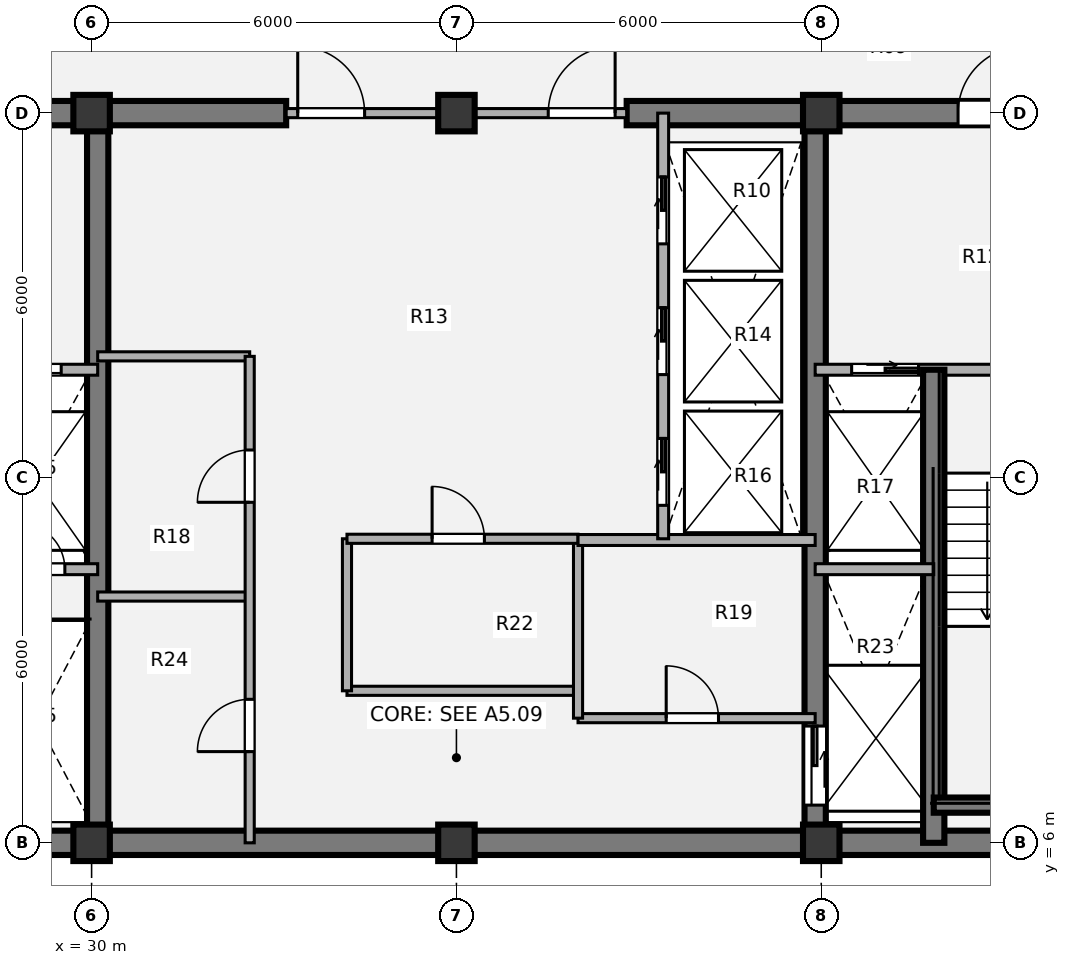
"""IFC4 building model, lengths in metres.
Left out: names, types, materials, properties, quantities, classifications, styles, units other than length and angle.
Written with IfcOpenShell. Run it as: python <this file> out.ifc"""

import sys

from ifc_helpers import new_model, si_unit, direction, frame, frame_2d, origin, origin_2d, place, context, subcontext, project, spatial, rectangle, extrude, source, transform, mapped, element, fill, save


model = new_model("IFC4")
c1 = context("Model", 3, precision=1e-05, world=origin(), true_north=direction((0.0, 1.0)))
c2 = subcontext(c1, "Body", "Model", "MODEL_VIEW")
j1 = project(units=[si_unit("LENGTHUNIT", "METRE"), si_unit("PLANEANGLEUNIT", "RADIAN")], contexts=[c1])
p1 = place(None, origin())
s1 = spatial("IfcSite", under=j1, at=p1, CompositionType="ELEMENT")
p2 = place(p1, origin())
s2 = spatial("IfcBuilding", under=s1, at=p2, CompositionType="ELEMENT")
p3 = place(p2, frame((0.0, 0.0, 257.04)))
s3 = spatial("IfcBuildingStorey", under=s2, at=p3, CompositionType="ELEMENT", Elevation=257.04)
m1 = source(origin(), c2, "Body", "SweptSolid", [
    extrude(rectangle(XDim=0.6, YDim=0.6, at=origin_2d()), origin(), (0.0, 0.0, 1.0), 3.78),
])
for number, where, z_axis, x_axis in (
    (1, (30.0, 6.0, 0.0), (0.0, 0.0, 1.0), (1.0, 0.0, 0.0)),
    (2, (36.0, 6.0, 0.0), (0.0, 0.0, 1.0), (1.0, 0.0, 0.0)),
    (3, (42.0, 6.0, 0.0), (0.0, 0.0, 1.0), (1.0, 0.0, 0.0)),
    (4, (30.0, 18.0, 0.0), (0.0, 0.0, 1.0), (1.0, 0.0, 0.0)),
    (5, (36.0, 18.0, 0.0), (0.0, 0.0, 1.0), (1.0, 0.0, 0.0)),
    (6, (42.0, 18.0, 0.0), (0.0, 0.0, 1.0), (1.0, 0.0, 0.0)),
):
    element("IfcColumn", number, at=place(p3, frame(where, z_axis=z_axis, x_axis=x_axis)), inside=s3, PredefinedType="COLUMN", context=c2, shape_type="MappedRepresentation", body=[
        mapped(m1, transform((0.0, 0.0, 0.0), x_axis=(1.0, 0.0, 0.0), y_axis=(0.0, 1.0, 0.0), z_axis=(0.0, 0.0, 1.0), scale=1.0)),
    ])
p4 = place(p3, frame((48.2, 6.0, 0.0), z_axis=(0.0, 0.0, 1.0), x_axis=(-1.0, 0.0, 0.0)))
e7 = element("IfcWall", 7, at=p4, inside=s3, PredefinedType="SHEAR", context=c2, shape_type="SweptSolid", body=[
    extrude(rectangle(XDim=24.4, YDim=0.4, at=frame_2d((12.2, 0.0))), origin(), (0.0, 0.0, 1.0), 3.78),
])
p5 = place(p3, frame((23.8, 18.0, 0.0), z_axis=(0.0, 0.0, 1.0), x_axis=(1.0, 0.0, 0.0)))
e8 = element("IfcWall", 8, at=p5, inside=s3, PredefinedType="SHEAR", context=c2, shape_type="SweptSolid", body=[
    extrude(rectangle(XDim=9.4, YDim=0.4, at=frame_2d((4.7, 0.0))), origin(), (0.0, 0.0, 1.0), 3.78),
])
p6 = place(p5, frame((2.95, 0.0, 0.0)))
e9 = element("IfcOpeningElement", 9, at=p6, cuts=e8, PredefinedType="OPENING", context=c2, shape_type="SweptSolid", body=[
    extrude(rectangle(XDim=1.1, YDim=2.1, at=origin_2d()), frame((0.55, 0.21, 1.05), z_axis=(0.0, -1.0, 0.0), x_axis=(1.0, 0.0, 0.0)), (0.0, 0.0, 1.0), 0.42),
])
p7 = place(p3, frame((38.8, 18.0, 0.0), z_axis=(0.0, 0.0, 1.0), x_axis=(1.0, 0.0, 0.0)))
e10 = element("IfcWall", 10, at=p7, inside=s3, PredefinedType="SHEAR", context=c2, shape_type="SweptSolid", body=[
    extrude(rectangle(XDim=9.4, YDim=0.4, at=frame_2d((4.7, 0.0))), origin(), (0.0, 0.0, 1.0), 3.78),
])
p8 = place(p7, frame((5.45, 0.0, 0.0)))
e11 = element("IfcOpeningElement", 11, at=p8, cuts=e10, PredefinedType="OPENING", context=c2, shape_type="SweptSolid", body=[
    extrude(rectangle(XDim=1.1, YDim=2.1, at=origin_2d()), frame((0.55, 0.21, 1.05), z_axis=(0.0, -1.0, 0.0), x_axis=(1.0, 0.0, 0.0)), (0.0, 0.0, 1.0), 0.42),
])
p9 = place(p3, frame((30.1, 6.0, 0.0), z_axis=(0.0, 0.0, 1.0), x_axis=(0.0, 1.0, 0.0)))
e12 = element("IfcWall", 12, at=p9, inside=s3, PredefinedType="SHEAR", context=c2, shape_type="SweptSolid", body=[
    extrude(rectangle(XDim=12.0, YDim=0.35, at=frame_2d((6.0, 0.0))), origin(), (0.0, 0.0, 1.0), 3.78),
])
p10 = place(p3, frame((41.9, 18.0, 0.0), z_axis=(0.0, 0.0, 1.0), x_axis=(0.0, -1.0, 0.0)))
e13 = element("IfcWall", 13, at=p10, inside=s3, PredefinedType="SHEAR", context=c2, shape_type="SweptSolid", body=[
    extrude(rectangle(XDim=12.0, YDim=0.35, at=frame_2d((6.0, 0.0))), origin(), (0.0, 0.0, 1.0), 3.78),
])
p11 = place(p10, frame((10.08, 0.0, 0.0)))
e14 = element("IfcOpeningElement", 14, at=p11, cuts=e13, PredefinedType="OPENING", context=c2, shape_type="SweptSolid", body=[
    extrude(rectangle(XDim=1.3, YDim=2.1, at=origin_2d()), frame((0.65, 0.185, 1.05), z_axis=(0.0, -1.0, 0.0), x_axis=(1.0, 0.0, 0.0)), (0.0, 0.0, 1.0), 0.37),
])
p12 = place(p3, frame((30.1, 14.0, 0.0), z_axis=(0.0, 0.0, 1.0), x_axis=(1.0, 0.0, 0.0)))
e15 = element("IfcWall", 15, at=p12, inside=s3, PredefinedType="PARTITIONING", context=c2, shape_type="SweptSolid", body=[
    extrude(rectangle(XDim=2.5, YDim=0.15, at=frame_2d((1.25, 0.0))), origin(), (0.0, 0.0, 1.0), 3.5),
])
p13 = place(p3, frame((34.2, 8.5, 0.0), z_axis=(0.0, 0.0, 1.0), x_axis=(1.0, 0.0, 0.0)))
e16 = element("IfcWall", 16, at=p13, inside=s3, PredefinedType="PARTITIONING", context=c2, shape_type="SweptSolid", body=[
    extrude(rectangle(XDim=3.8, YDim=0.15, at=frame_2d((1.9, 0.0))), origin(), (0.0, 0.0, 1.0), 3.5),
])
p14 = place(p3, frame((38.0, 8.05, 0.0), z_axis=(0.0, 0.0, 1.0), x_axis=(1.0, 0.0, 0.0)))
e17 = element("IfcWall", 17, at=p14, inside=s3, PredefinedType="PARTITIONING", context=c2, shape_type="SweptSolid", body=[
    extrude(rectangle(XDim=3.9, YDim=0.15, at=frame_2d((1.95, 0.0))), origin(), (0.0, 0.0, 1.0), 3.5),
])
p15 = place(p14, frame((1.45, 0.0, 0.0)))
e18 = element("IfcOpeningElement", 18, at=p15, cuts=e17, PredefinedType="OPENING", context=c2, shape_type="SweptSolid", body=[
    extrude(rectangle(XDim=0.86, YDim=2.1, at=origin_2d()), frame((0.43, 0.085, 1.05), z_axis=(0.0, -1.0, 0.0), x_axis=(1.0, 0.0, 0.0)), (0.0, 0.0, 1.0), 0.17),
])
p16 = place(p3, frame((34.2, 8.5, 0.0), z_axis=(0.0, 0.0, 1.0), x_axis=(0.0, 1.0, 0.0)))
e19 = element("IfcWall", 19, at=p16, inside=s3, PredefinedType="PARTITIONING", context=c2, shape_type="SweptSolid", body=[
    extrude(rectangle(XDim=2.5, YDim=0.15, at=frame_2d((1.25, 0.0))), origin(), (0.0, 0.0, 1.0), 3.5),
])
p17 = place(p3, frame((38.0, 8.05, 0.0), z_axis=(0.0, 0.0, 1.0), x_axis=(0.0, 1.0, 0.0)))
e20 = element("IfcWall", 20, at=p17, inside=s3, PredefinedType="PARTITIONING", context=c2, shape_type="SweptSolid", body=[
    extrude(rectangle(XDim=2.95, YDim=0.15, at=frame_2d((1.475, 0.0))), origin(), (0.0, 0.0, 1.0), 3.5),
])
p18 = place(p3, frame((34.2, 11.0, 0.0), z_axis=(0.0, 0.0, 1.0), x_axis=(1.0, 0.0, 0.0)))
e21 = element("IfcWall", 21, at=p18, inside=s3, PredefinedType="PARTITIONING", context=c2, shape_type="SweptSolid", body=[
    extrude(rectangle(XDim=3.8, YDim=0.15, at=frame_2d((1.9, 0.0))), origin(), (0.0, 0.0, 1.0), 3.5),
])
p19 = place(p18, frame((1.4, 0.0, 0.0)))
e22 = element("IfcOpeningElement", 22, at=p19, cuts=e21, PredefinedType="OPENING", context=c2, shape_type="SweptSolid", body=[
    extrude(rectangle(XDim=0.86, YDim=2.1, at=origin_2d()), frame((0.43, 0.085, 1.05), z_axis=(0.0, -1.0, 0.0), x_axis=(1.0, 0.0, 0.0)), (0.0, 0.0, 1.0), 0.17),
])
p20 = place(p3, frame((38.0, 10.98, 0.0), z_axis=(0.0, 0.0, 1.0), x_axis=(1.0, 0.0, 0.0)))
e23 = element("IfcWall", 23, at=p20, inside=s3, PredefinedType="PARTITIONING", context=c2, shape_type="SweptSolid", body=[
    extrude(rectangle(XDim=3.9, YDim=0.18, at=frame_2d((1.95, 0.0))), origin(), (0.0, 0.0, 1.0), 3.5),
])
p21 = place(p3, frame((30.1, 10.05, 0.0), z_axis=(0.0, 0.0, 1.0), x_axis=(1.0, 0.0, 0.0)))
e24 = element("IfcWall", 24, at=p21, inside=s3, PredefinedType="PARTITIONING", context=c2, shape_type="SweptSolid", body=[
    extrude(rectangle(XDim=2.5, YDim=0.15, at=frame_2d((1.25, 0.0))), origin(), (0.0, 0.0, 1.0), 3.5),
])
p22 = place(p3, frame((32.6, 6.0, 0.0), z_axis=(0.0, 0.0, 1.0), x_axis=(0.0, 1.0, 0.0)))
e25 = element("IfcWall", 25, at=p22, inside=s3, PredefinedType="PARTITIONING", context=c2, shape_type="SweptSolid", body=[
    extrude(rectangle(XDim=8.0, YDim=0.15, at=frame_2d((4.0, 0.0))), origin(), (0.0, 0.0, 1.0), 3.5),
])
p23 = place(p22, frame((1.5, 0.0, 0.0)))
e26 = element("IfcOpeningElement", 26, at=p23, cuts=e25, PredefinedType="OPENING", context=c2, shape_type="SweptSolid", body=[
    extrude(rectangle(XDim=0.86, YDim=2.1, at=origin_2d()), frame((0.43, 0.085, 1.05), z_axis=(0.0, -1.0, 0.0), x_axis=(1.0, 0.0, 0.0)), (0.0, 0.0, 1.0), 0.17),
])
p24 = place(p22, frame((5.6, 0.0, 0.0)))
e27 = element("IfcOpeningElement", 27, at=p24, cuts=e25, PredefinedType="OPENING", context=c2, shape_type="SweptSolid", body=[
    extrude(rectangle(XDim=0.86, YDim=2.1, at=origin_2d()), frame((0.43, 0.085, 1.05), z_axis=(0.0, -1.0, 0.0), x_axis=(1.0, 0.0, 0.0)), (0.0, 0.0, 1.0), 0.17),
])
p25 = place(p3, frame((33.2, 18.0, 0.0), z_axis=(0.0, 0.0, 1.0), x_axis=(1.0, 0.0, 0.0)))
e28 = element("IfcWall", 28, at=p25, inside=s3, PredefinedType="PARTITIONING", context=c2, shape_type="SweptSolid", body=[
    extrude(rectangle(XDim=5.6, YDim=0.15, at=frame_2d((2.8, 0.0))), origin(), (0.0, 0.0, 1.0), 2.515),
])
p26 = place(p25, frame((0.19, 0.0, 0.0)))
e29 = element("IfcOpeningElement", 29, at=p26, cuts=e28, PredefinedType="OPENING", context=c2, shape_type="SweptSolid", body=[
    extrude(rectangle(XDim=1.1, YDim=2.1, at=origin_2d()), frame((0.55, 0.085, 1.05), z_axis=(0.0, -1.0, 0.0), x_axis=(1.0, 0.0, 0.0)), (0.0, 0.0, 1.0), 0.17),
])
p27 = place(p25, frame((4.31, 0.0, 0.0)))
e30 = element("IfcOpeningElement", 30, at=p27, cuts=e28, PredefinedType="OPENING", context=c2, shape_type="SweptSolid", body=[
    extrude(rectangle(XDim=1.1, YDim=2.1, at=origin_2d()), frame((0.55, 0.085, 1.05), z_axis=(0.0, -1.0, 0.0), x_axis=(1.0, 0.0, 0.0)), (0.0, 0.0, 1.0), 0.17),
])
p28 = place(p3, frame((24.0, 13.78, 0.0), z_axis=(0.0, 0.0, 1.0), x_axis=(1.0, 0.0, 0.0)))
e31 = element("IfcWall", 31, at=p28, inside=s3, PredefinedType="PARTITIONING", context=c2, shape_type="SweptSolid", body=[
    extrude(rectangle(XDim=6.1, YDim=0.18, at=frame_2d((3.05, 0.0))), origin(), (0.0, 0.0, 1.0), 3.5),
])
p29 = place(p28, frame((1.15, 0.0, 0.0)))
e32 = element("IfcOpeningElement", 32, at=p29, cuts=e31, PredefinedType="OPENING", context=c2, shape_type="SweptSolid", body=[
    extrude(rectangle(XDim=1.1, YDim=2.1, at=origin_2d()), frame((0.55, 0.1, 1.05), z_axis=(0.0, -1.0, 0.0), x_axis=(1.0, 0.0, 0.0)), (0.0, 0.0, 1.0), 0.2),
])
p30 = place(p28, frame((4.4, 0.0, 0.0)))
e33 = element("IfcOpeningElement", 33, at=p30, cuts=e31, PredefinedType="OPENING", context=c2, shape_type="SweptSolid", body=[
    extrude(rectangle(XDim=1.1, YDim=2.1, at=origin_2d()), frame((0.55, 0.1, 1.05), z_axis=(0.0, -1.0, 0.0), x_axis=(1.0, 0.0, 0.0)), (0.0, 0.0, 1.0), 0.2),
])
p31 = place(p3, frame((28.15, 10.5, 0.0), z_axis=(0.0, 0.0, 1.0), x_axis=(1.0, 0.0, 0.0)))
e34 = element("IfcWall", 34, at=p31, inside=s3, PredefinedType="PARTITIONING", context=c2, shape_type="SweptSolid", body=[
    extrude(rectangle(XDim=1.95, YDim=0.18, at=frame_2d((0.975, 0.0))), origin(), (0.0, 0.0, 1.0), 3.5),
])
p32 = place(p31, frame((0.65, 0.0, 0.0)))
e35 = element("IfcOpeningElement", 35, at=p32, cuts=e34, PredefinedType="OPENING", context=c2, shape_type="SweptSolid", body=[
    extrude(rectangle(XDim=0.76, YDim=2.05, at=origin_2d()), frame((0.38, 0.1, 1.025), z_axis=(0.0, -1.0, 0.0), x_axis=(1.0, 0.0, 0.0)), (0.0, 0.0, 1.0), 0.2),
])
p33 = place(p3, frame((41.9, 13.78, 0.0), z_axis=(0.0, 0.0, 1.0), x_axis=(1.0, 0.0, 0.0)))
e36 = element("IfcWall", 36, at=p33, inside=s3, PredefinedType="PARTITIONING", context=c2, shape_type="SweptSolid", body=[
    extrude(rectangle(XDim=6.1, YDim=0.18, at=frame_2d((3.05, 0.0))), origin(), (0.0, 0.0, 1.0), 3.5),
])
p34 = place(p33, frame((0.6, 0.0, 0.0)))
e37 = element("IfcOpeningElement", 37, at=p34, cuts=e36, PredefinedType="OPENING", context=c2, shape_type="SweptSolid", body=[
    extrude(rectangle(XDim=1.1, YDim=2.1, at=origin_2d()), frame((0.55, 0.1, 1.05), z_axis=(0.0, -1.0, 0.0), x_axis=(1.0, 0.0, 0.0)), (0.0, 0.0, 1.0), 0.2),
])
p35 = place(p33, frame((3.8, 0.0, 0.0)))
e38 = element("IfcOpeningElement", 38, at=p35, cuts=e36, PredefinedType="OPENING", context=c2, shape_type="SweptSolid", body=[
    extrude(rectangle(XDim=1.1, YDim=2.1, at=origin_2d()), frame((0.55, 0.1, 1.05), z_axis=(0.0, -1.0, 0.0), x_axis=(1.0, 0.0, 0.0)), (0.0, 0.0, 1.0), 0.2),
])
p36 = place(p3, frame((43.85, 6.0, 0.0), z_axis=(0.0, 0.0, 1.0), x_axis=(0.0, 1.0, 0.0)))
e39 = element("IfcWall", 39, at=p36, inside=s3, PredefinedType="SHEAR", context=c2, shape_type="SweptSolid", body=[
    extrude(rectangle(XDim=7.78, YDim=0.35, at=frame_2d((3.89, 0.0))), origin(), (0.0, 0.0, 1.0), 3.85),
])
p37 = place(p3, frame((43.85, 6.62, 0.0), z_axis=(0.0, 0.0, 1.0), x_axis=(1.0, 0.0, 0.0)))
e40 = element("IfcWall", 40, at=p37, inside=s3, PredefinedType="SHEAR", context=c2, shape_type="SweptSolid", body=[
    extrude(rectangle(XDim=3.57, YDim=0.25, at=frame_2d((1.785, 0.0))), origin(), (0.0, 0.0, 1.0), 3.85),
])
p38 = place(p3, frame((41.9, 10.5, 0.0), z_axis=(0.0, 0.0, 1.0), x_axis=(1.0, 0.0, 0.0)))
e41 = element("IfcWall", 41, at=p38, inside=s3, PredefinedType="PARTITIONING", context=c2, shape_type="SweptSolid", body=[
    extrude(rectangle(XDim=1.95, YDim=0.18, at=frame_2d((0.975, 0.0))), origin(), (0.0, 0.0, 1.0), 3.5),
])
p39 = place(p3, frame((39.4, 11.0, 0.0), z_axis=(0.0, 0.0, 1.0), x_axis=(0.0, 1.0, 0.0)))
e42 = element("IfcWall", 42, at=p39, inside=s3, PredefinedType="PARTITIONING", context=c2, shape_type="SweptSolid", body=[
    extrude(rectangle(XDim=7.0, YDim=0.18, at=frame_2d((3.5, 0.0))), origin(), (0.0, 0.0, 1.0), 3.5),
])
p40 = place(p39, frame((0.55, 0.0, 0.0)))
e43 = element("IfcOpeningElement", 43, at=p40, cuts=e42, PredefinedType="OPENING", context=c2, shape_type="SweptSolid", body=[
    extrude(rectangle(XDim=1.1, YDim=2.1, at=origin_2d()), frame((0.55, 0.1, 1.05), z_axis=(0.0, -1.0, 0.0), x_axis=(1.0, 0.0, 0.0)), (0.0, 0.0, 1.0), 0.2),
])
p41 = place(p39, frame((2.7, 0.0, 0.0)))
e44 = element("IfcOpeningElement", 44, at=p41, cuts=e42, PredefinedType="OPENING", context=c2, shape_type="SweptSolid", body=[
    extrude(rectangle(XDim=1.1, YDim=2.1, at=origin_2d()), frame((0.55, 0.1, 1.05), z_axis=(0.0, -1.0, 0.0), x_axis=(1.0, 0.0, 0.0)), (0.0, 0.0, 1.0), 0.2),
])
p42 = place(p39, frame((4.85, 0.0, 0.0)))
e45 = element("IfcOpeningElement", 45, at=p42, cuts=e42, PredefinedType="OPENING", context=c2, shape_type="SweptSolid", body=[
    extrude(rectangle(XDim=1.1, YDim=2.1, at=origin_2d()), frame((0.55, 0.1, 1.05), z_axis=(0.0, -1.0, 0.0), x_axis=(1.0, 0.0, 0.0)), (0.0, 0.0, 1.0), 0.2),
])
m2 = source(origin(), c2, "Body", "SweptSolid", [
    extrude(rectangle(XDim=0.86, YDim=2.1, at=origin_2d()), frame((0.43, 0.025, 1.05), z_axis=(0.0, -1.0, 0.0), x_axis=(1.0, 0.0, 0.0)), (0.0, 0.0, 1.0), 0.05),
])
p43 = place(p15, origin())
e46 = element("IfcDoor", 46, at=p43, inside=s3, OperationType="SINGLE_SWING_LEFT", PredefinedType="DOOR", context=c2, shape_type="MappedRepresentation", body=[
    mapped(m2, transform((0.0, 0.0, 0.0), x_axis=(1.0, 0.0, 0.0), y_axis=(0.0, 1.0, 0.0), z_axis=(0.0, 0.0, 1.0), scale=1.0)),
])
fill(e18, e46)
p44 = place(p19, origin())
e47 = element("IfcDoor", 47, at=p44, inside=s3, OperationType="SINGLE_SWING_LEFT", PredefinedType="DOOR", context=c2, shape_type="MappedRepresentation", body=[
    mapped(m2, transform((0.0, 0.0, 0.0), x_axis=(1.0, 0.0, 0.0), y_axis=(0.0, 1.0, 0.0), z_axis=(0.0, 0.0, 1.0), scale=1.0)),
])
fill(e22, e47)
p45 = place(p23, origin())
e48 = element("IfcDoor", 48, at=p45, inside=s3, OperationType="SINGLE_SWING_LEFT", PredefinedType="DOOR", context=c2, shape_type="MappedRepresentation", body=[
    mapped(m2, transform((0.0, 0.0, 0.0), x_axis=(1.0, 0.0, 0.0), y_axis=(0.0, 1.0, 0.0), z_axis=(0.0, 0.0, 1.0), scale=1.0)),
])
fill(e26, e48)
p46 = place(p24, origin())
e49 = element("IfcDoor", 49, at=p46, inside=s3, OperationType="SINGLE_SWING_LEFT", PredefinedType="DOOR", context=c2, shape_type="MappedRepresentation", body=[
    mapped(m2, transform((0.0, 0.0, 0.0), x_axis=(1.0, 0.0, 0.0), y_axis=(0.0, 1.0, 0.0), z_axis=(0.0, 0.0, 1.0), scale=1.0)),
])
fill(e27, e49)
m3 = source(origin(), c2, "Body", "SweptSolid", [
    extrude(rectangle(XDim=1.1, YDim=2.1, at=origin_2d()), frame((0.55, 0.025, 1.05), z_axis=(0.0, -1.0, 0.0), x_axis=(1.0, 0.0, 0.0)), (0.0, 0.0, 1.0), 0.05),
])
p47 = place(p26, origin())
e50 = element("IfcDoor", 50, at=p47, inside=s3, OperationType="SINGLE_SWING_LEFT", PredefinedType="DOOR", context=c2, shape_type="MappedRepresentation", body=[
    mapped(m3, transform((0.0, 0.0, 0.0), x_axis=(1.0, 0.0, 0.0), y_axis=(0.0, 1.0, 0.0), z_axis=(0.0, 0.0, 1.0), scale=1.0)),
])
fill(e29, e50)
p48 = place(p27, origin())
e51 = element("IfcDoor", 51, at=p48, inside=s3, OperationType="SINGLE_SWING_RIGHT", PredefinedType="DOOR", context=c2, shape_type="MappedRepresentation", body=[
    mapped(m3, transform((0.0, 0.0, 0.0), x_axis=(1.0, 0.0, 0.0), y_axis=(0.0, 1.0, 0.0), z_axis=(0.0, 0.0, 1.0), scale=1.0)),
])
fill(e30, e51)
m4 = source(origin(), c2, "Body", "SweptSolid", [
    extrude(rectangle(XDim=1.1, YDim=2.1, at=origin_2d()), frame((0.55, 0.025, 1.05), z_axis=(0.0, -1.0, 0.0), x_axis=(1.0, 0.0, 0.0)), (0.0, 0.0, 1.0), 0.05),
])
p49 = place(p30, origin())
e52 = element("IfcDoor", 52, at=p49, inside=s3, OperationType="SLIDING_TO_LEFT", PredefinedType="DOOR", context=c2, shape_type="MappedRepresentation", body=[
    mapped(m4, transform((0.0, 0.0, 0.0), x_axis=(1.0, 0.0, 0.0), y_axis=(0.0, 1.0, 0.0), z_axis=(0.0, 0.0, 1.0), scale=1.0)),
])
fill(e33, e52)
m5 = source(origin(), c2, "Body", "SweptSolid", [
    extrude(rectangle(XDim=0.76, YDim=2.05, at=origin_2d()), frame((0.38, 0.025, 1.025), z_axis=(0.0, -1.0, 0.0), x_axis=(1.0, 0.0, 0.0)), (0.0, 0.0, 1.0), 0.05),
])
p50 = place(p32, origin())
e53 = element("IfcDoor", 53, at=p50, inside=s3, OperationType="SINGLE_SWING_LEFT", PredefinedType="DOOR", context=c2, shape_type="MappedRepresentation", body=[
    mapped(m5, transform((0.0, 0.0, 0.0), x_axis=(1.0, 0.0, 0.0), y_axis=(0.0, 1.0, 0.0), z_axis=(0.0, 0.0, 1.0), scale=1.0)),
])
fill(e35, e53)
p51 = place(p34, origin())
e54 = element("IfcDoor", 54, at=p51, inside=s3, OperationType="SLIDING_TO_RIGHT", PredefinedType="DOOR", context=c2, shape_type="MappedRepresentation", body=[
    mapped(m4, transform((0.0, 0.0, 0.0), x_axis=(1.0, 0.0, 0.0), y_axis=(0.0, 1.0, 0.0), z_axis=(0.0, 0.0, 1.0), scale=1.0)),
])
fill(e37, e54)
m6 = source(origin(), c2, "Body", "SweptSolid", [
    extrude(rectangle(XDim=1.3, YDim=2.1, at=origin_2d()), frame((0.65, 0.025, 1.05), z_axis=(0.0, -1.0, 0.0), x_axis=(1.0, 0.0, 0.0)), (0.0, 0.0, 1.0), 0.05),
])
p52 = place(p11, origin())
e55 = element("IfcDoor", 55, at=p52, inside=s3, OperationType="SLIDING_TO_LEFT", PredefinedType="DOOR", context=c2, shape_type="MappedRepresentation", body=[
    mapped(m6, transform((0.0, 0.0, 0.0), x_axis=(1.0, 0.0, 0.0), y_axis=(0.0, 1.0, 0.0), z_axis=(0.0, 0.0, 1.0), scale=1.0)),
])
fill(e14, e55)
p53 = place(p8, origin())
e56 = element("IfcDoor", 56, at=p53, inside=s3, OperationType="SINGLE_SWING_RIGHT", PredefinedType="DOOR", context=c2, shape_type="MappedRepresentation", body=[
    mapped(m3, transform((0.0, 0.0, 0.0), x_axis=(1.0, 0.0, 0.0), y_axis=(0.0, 1.0, 0.0), z_axis=(0.0, 0.0, 1.0), scale=1.0)),
])
fill(e11, e56)
p54 = place(p40, origin())
e57 = element("IfcDoor", 57, at=p54, inside=s3, OperationType="SLIDING_TO_RIGHT", PredefinedType="DOOR", context=c2, shape_type="MappedRepresentation", body=[
    mapped(m4, transform((0.0, 0.0, 0.0), x_axis=(1.0, 0.0, 0.0), y_axis=(0.0, 1.0, 0.0), z_axis=(0.0, 0.0, 1.0), scale=1.0)),
])
fill(e43, e57)
p55 = place(p41, origin())
e58 = element("IfcDoor", 58, at=p55, inside=s3, OperationType="SLIDING_TO_RIGHT", PredefinedType="DOOR", context=c2, shape_type="MappedRepresentation", body=[
    mapped(m4, transform((0.0, 0.0, 0.0), x_axis=(1.0, 0.0, 0.0), y_axis=(0.0, 1.0, 0.0), z_axis=(0.0, 0.0, 1.0), scale=1.0)),
])
fill(e44, e58)
p56 = place(p42, origin())
e59 = element("IfcDoor", 59, at=p56, inside=s3, OperationType="SLIDING_TO_RIGHT", PredefinedType="DOOR", context=c2, shape_type="MappedRepresentation", body=[
    mapped(m4, transform((0.0, 0.0, 0.0), x_axis=(1.0, 0.0, 0.0), y_axis=(0.0, 1.0, 0.0), z_axis=(0.0, 0.0, 1.0), scale=1.0)),
])
fill(e45, e59)
save(model, sys.argv[1])
